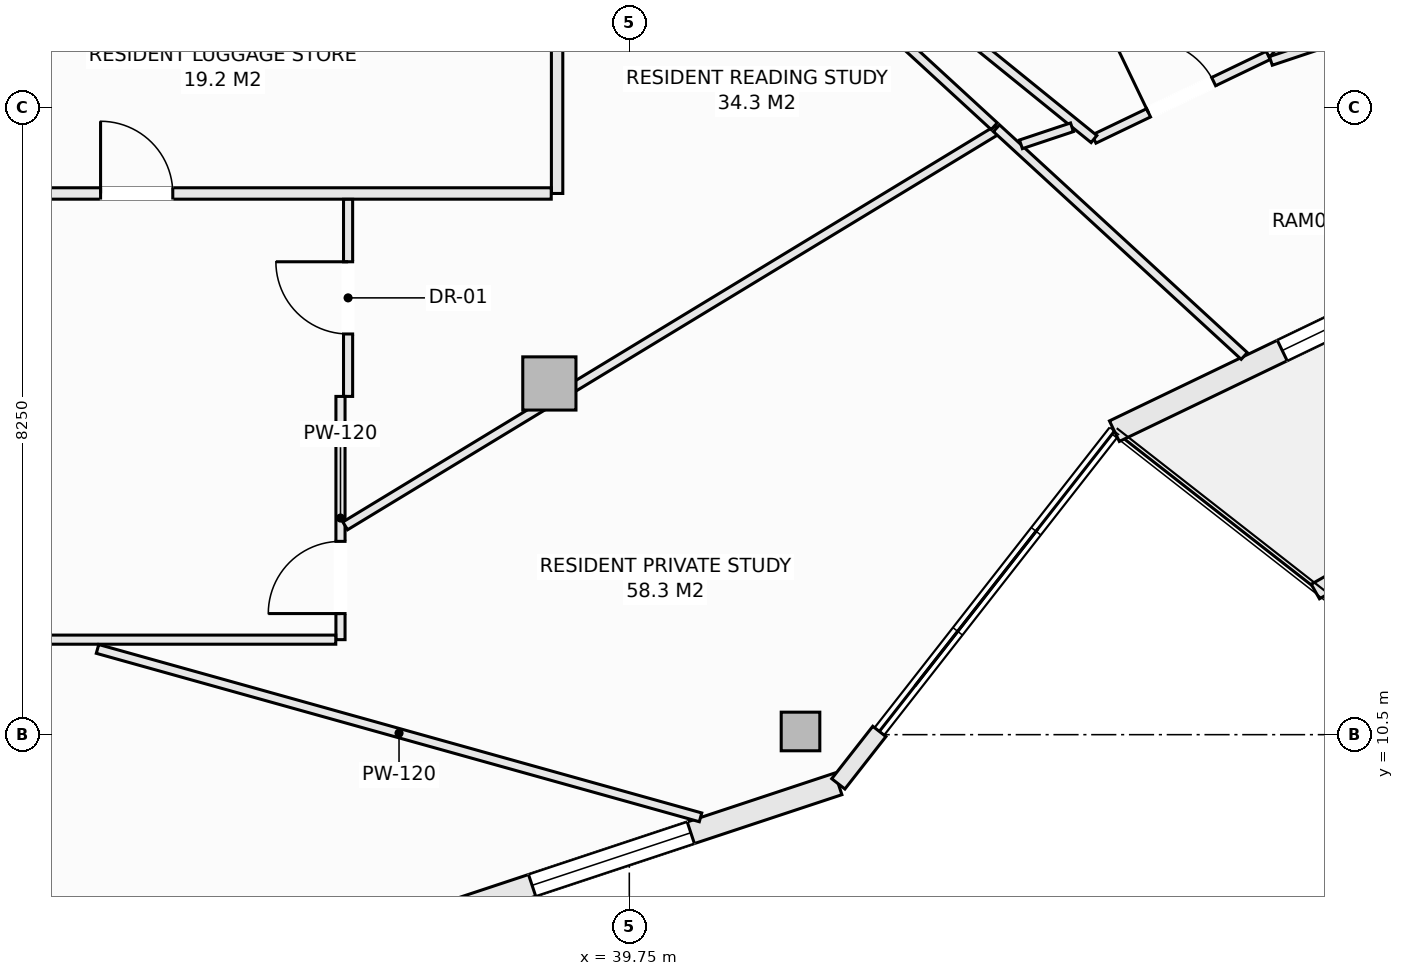
"""IFC4 building model, lengths in metres.
Left out: names, types, materials, properties, quantities, classifications, styles, units other than length and angle.
Written with IfcOpenShell. Run it as: python <this file> out.ifc"""

import sys

from ifc_helpers import new_model, si_unit, direction, frame, frame_2d, origin, origin_2d, place, context, subcontext, project, spatial, rectangle, hollow_rectangle, extrude, element, fill, save


model = new_model("IFC4")
c1 = context("Model", 3, precision=1e-05, world=origin(), true_north=direction((0.0, 1.0)))
c2 = subcontext(c1, "Body", "Model", "MODEL_VIEW")
j1 = project(units=[si_unit("LENGTHUNIT", "METRE"), si_unit("PLANEANGLEUNIT", "RADIAN")], contexts=[c1])
p1 = place(None, origin())
s1 = spatial("IfcSite", under=j1, at=p1, CompositionType="ELEMENT")
p2 = place(p1, origin())
s2 = spatial("IfcBuilding", under=s1, at=p2, CompositionType="ELEMENT")
p3 = place(p2, frame((0.0, 0.0, 219.5)))
s3 = spatial("IfcBuildingStorey", under=s2, at=p3, CompositionType="ELEMENT", Elevation=219.5)
p4 = place(p3, frame((42.003, 10.542, -0.27), z_axis=(0.0, 0.0, 1.0), x_axis=(1.0, 0.0, 0.0)))
e1 = element("IfcColumn", 1, at=p4, inside=s3, PredefinedType="COLUMN", context=c2, shape_type="SweptSolid", body=[
    extrude(hollow_rectangle(XDim=0.508, YDim=0.508, WallThickness=0.019, at=origin_2d()), origin(), (0.0, 0.0, 1.0), 3.3),
])
p5 = place(p3, frame((38.698, 15.121, -0.27), z_axis=(0.0, 0.0, 1.0), x_axis=(1.0, 0.0, 0.0)))
e2 = element("IfcColumn", 2, at=p5, inside=s3, PredefinedType="COLUMN", context=c2, shape_type="SweptSolid", body=[
    extrude(rectangle(XDim=0.7, YDim=0.7, at=origin_2d()), origin(), (0.0, 0.0, 1.0), 3.3),
])
p6 = place(p3, frame((36.531, 7.875, 0.0), z_axis=(0.0, 0.0, 1.0), x_axis=(0.949240877604, 0.314550085495, 0.0)))
e3 = element("IfcWall", 3, at=p6, inside=s3, PredefinedType="SOLIDWALL", context=c2, shape_type="SweptSolid", body=[
    extrude(rectangle(XDim=6.288, YDim=0.3, at=frame_2d((3.144, 0.0))), origin(), (0.0, 0.0, 1.0), 2.605),
])
p7 = place(p6, frame((2.044, 0.0, 0.72)))
e4 = element("IfcOpeningElement", 4, at=p7, cuts=e3, PredefinedType="OPENING", context=c2, shape_type="SweptSolid", body=[
    extrude(rectangle(XDim=2.2, YDim=1.65, at=frame_2d((1.1, 0.825))), frame((0.0, 0.16, 0.0), z_axis=(0.0, -1.0, 0.0), x_axis=(1.0, 0.0, 0.0)), (0.0, 0.0, 1.0), 0.32),
])
p8 = place(p3, frame((42.5, 9.853, 0.0), z_axis=(0.0, 0.0, 1.0), x_axis=(0.61650363284, 0.787352062736, 0.0)))
e5 = element("IfcWall", 5, at=p8, inside=s3, PredefinedType="SOLIDWALL", context=c2, shape_type="SweptSolid", body=[
    extrude(rectangle(XDim=0.876, YDim=0.22, at=frame_2d((0.438, 0.0))), origin(), (0.0, 0.0, 1.0), 2.605),
])
p9 = place(p3, frame((46.133, 14.493, 0.0), z_axis=(0.0, 0.0, 1.0), x_axis=(0.901348331142, 0.433094892545, 0.0)))
e6 = element("IfcWall", 6, at=p9, inside=s3, PredefinedType="SOLIDWALL", context=c2, shape_type="SweptSolid", body=[
    extrude(rectangle(XDim=6.021, YDim=0.3, at=frame_2d((3.01, 0.0))), origin(), (0.0, 0.0, 1.0), 2.605),
])
p10 = place(p9, frame((2.45, 0.0, 0.72)))
e7 = element("IfcOpeningElement", 7, at=p10, cuts=e6, PredefinedType="OPENING", context=c2, shape_type="SweptSolid", body=[
    extrude(rectangle(XDim=2.2, YDim=1.65, at=frame_2d((1.1, 0.825))), frame((0.0, 0.16, 0.0), z_axis=(0.0, -1.0, 0.0), x_axis=(1.0, 0.0, 0.0)), (0.0, 0.0, 1.0), 0.32),
])
p11 = place(p3, frame((48.776, 12.383, 0.0), z_axis=(0.0, 0.0, 1.0), x_axis=(0.869860619267, 0.493297580623, 0.0)))
e8 = element("IfcWall", 8, at=p11, inside=s3, PredefinedType="PARAPET", context=c2, shape_type="SweptSolid", body=[
    extrude(rectangle(XDim=6.743, YDim=0.22, at=frame_2d((3.371, 0.0))), origin(), (0.0, 0.0, 1.0), 0.52),
])
p12 = place(p3, frame((38.8, 17.62, 0.0), z_axis=(0.0, 0.0, 1.0), x_axis=(0.0, 1.0, 0.0)))
e9 = element("IfcWall", 9, at=p12, inside=s3, PredefinedType="PARTITIONING", context=c2, shape_type="SweptSolid", body=[
    extrude(rectangle(XDim=2.18, YDim=0.15, at=frame_2d((1.09, 0.0))), origin(), (0.0, 0.0, 1.0), 3.03),
])
p13 = place(p3, frame((30.077, 17.62, 0.0), z_axis=(0.0, 0.0, 1.0), x_axis=(1.0, 0.0, 0.0)))
e10 = element("IfcWall", 10, at=p13, inside=s3, PredefinedType="PARTITIONING", context=c2, shape_type="SweptSolid", body=[
    extrude(rectangle(XDim=8.646, YDim=0.15, at=frame_2d((4.323, 0.0))), origin(), (0.0, 0.0, 1.0), 3.03),
])
p14 = place(p13, frame((2.717, 0.0, 0.0)))
e11 = element("IfcOpeningElement", 11, at=p14, cuts=e10, PredefinedType="OPENING", context=c2, shape_type="SweptSolid", body=[
    extrude(rectangle(XDim=0.95, YDim=2.1, at=frame_2d((0.475, 1.05))), frame((0.0, 0.085, 0.0), z_axis=(0.0, -1.0, 0.0), x_axis=(1.0, 0.0, 0.0)), (0.0, 0.0, 1.0), 0.17),
])
p15 = place(p3, frame((41.52, 24.892, 0.0), z_axis=(0.0, 0.0, 1.0), x_axis=(0.777027167904, -0.629467060567, 0.0)))
e12 = element("IfcWall", 12, at=p15, inside=s3, PredefinedType="PARTITIONING", context=c2, shape_type="SweptSolid", body=[
    extrude(rectangle(XDim=8.62, YDim=0.12, at=frame_2d((4.31, 0.0))), origin(), (0.0, 0.0, 1.0), 2.77),
])
p16 = place(p15, frame((5.4, 0.0, 0.0)))
e13 = element("IfcOpeningElement", 13, at=p16, cuts=e12, PredefinedType="OPENING", context=c2, shape_type="SweptSolid", body=[
    extrude(rectangle(XDim=0.95, YDim=2.1, at=frame_2d((0.475, 1.05))), frame((0.0, 0.07, 0.0), z_axis=(0.0, -1.0, 0.0), x_axis=(1.0, 0.0, 0.0)), (0.0, 0.0, 1.0), 0.14),
])
p17 = place(p15, frame((1.578, 0.0, 0.0)))
e14 = element("IfcOpeningElement", 14, at=p17, cuts=e12, PredefinedType="OPENING", context=c2, shape_type="SweptSolid", body=[
    extrude(rectangle(XDim=0.95, YDim=2.1, at=frame_2d((0.475, 1.05))), frame((0.0, 0.07, 0.0), z_axis=(0.0, -1.0, 0.0), x_axis=(1.0, 0.0, 0.0)), (0.0, 0.0, 1.0), 0.14),
])
p18 = place(p3, frame((45.864, 18.336, 0.0), z_axis=(0.0, 0.0, 1.0), x_axis=(0.901512568896, 0.432752918097, 0.0)))
e15 = element("IfcWall", 15, at=p18, inside=s3, PredefinedType="PARTITIONING", context=c2, shape_type="SweptSolid", body=[
    extrude(rectangle(XDim=2.543, YDim=0.12, at=frame_2d((1.271, 0.0))), origin(), (0.0, 0.0, 1.0), 3.03),
])
p19 = place(p18, frame((0.796, 0.0, 0.0)))
e16 = element("IfcOpeningElement", 16, at=p19, cuts=e15, PredefinedType="OPENING", context=c2, shape_type="SweptSolid", body=[
    extrude(rectangle(XDim=0.95, YDim=2.1, at=frame_2d((0.475, 1.05))), frame((0.0, 0.07, 0.0), z_axis=(0.0, -1.0, 0.0), x_axis=(1.0, 0.0, 0.0)), (0.0, 0.0, 1.0), 0.14),
])
p20 = place(p3, frame((42.198, 21.306, 0.0), z_axis=(0.0, 0.0, 1.0), x_axis=(0.777012245854, -0.629485480208, 0.0)))
e17 = element("IfcWall", 17, at=p20, inside=s3, PredefinedType="PARTITIONING", context=c2, shape_type="SweptSolid", body=[
    extrude(rectangle(XDim=4.718, YDim=0.12, at=frame_2d((2.359, 0.0))), origin(), (0.0, 0.0, 1.0), 2.77),
])
p21 = place(p3, frame((36.05, 14.95, 0.0), z_axis=(0.0, 0.0, 1.0), x_axis=(0.0, 1.0, 0.0)))
e18 = element("IfcWall", 18, at=p21, inside=s3, PredefinedType="PARTITIONING", context=c2, shape_type="SweptSolid", body=[
    extrude(rectangle(XDim=2.593, YDim=0.12, at=frame_2d((1.296, 0.0))), origin(), (0.0, 0.0, 1.0), 3.03),
])
p22 = place(p21, frame((0.822, 0.0, 0.0)))
e19 = element("IfcOpeningElement", 19, at=p22, cuts=e18, PredefinedType="OPENING", context=c2, shape_type="SweptSolid", body=[
    extrude(rectangle(XDim=0.95, YDim=2.1, at=frame_2d((0.475, 1.05))), frame((0.0, 0.07, 0.0), z_axis=(0.0, -1.0, 0.0), x_axis=(1.0, 0.0, 0.0)), (0.0, 0.0, 1.0), 0.14),
])
p23 = place(p3, frame((35.95, 11.75, 0.0), z_axis=(0.0, 0.0, 1.0), x_axis=(0.0, 1.0, 0.0)))
e20 = element("IfcWall", 20, at=p23, inside=s3, PredefinedType="PARTITIONING", context=c2, shape_type="SweptSolid", body=[
    extrude(rectangle(XDim=3.2, YDim=0.12, at=frame_2d((1.6, 0.0))), origin(), (0.0, 0.0, 1.0), 3.03),
])
p24 = place(p23, frame((0.343, 0.0, 0.0)))
e21 = element("IfcOpeningElement", 21, at=p24, cuts=e20, PredefinedType="OPENING", context=c2, shape_type="SweptSolid", body=[
    extrude(rectangle(XDim=0.95, YDim=2.1, at=frame_2d((0.475, 1.05))), frame((0.0, 0.07, 0.0), z_axis=(0.0, -1.0, 0.0), x_axis=(1.0, 0.0, 0.0)), (0.0, 0.0, 1.0), 0.14),
])
p25 = place(p3, frame((27.227, 11.75, 0.0), z_axis=(0.0, 0.0, 1.0), x_axis=(1.0, 0.0, 0.0)))
e22 = element("IfcWall", 22, at=p25, inside=s3, PredefinedType="PARTITIONING", context=c2, shape_type="SweptSolid", body=[
    extrude(rectangle(XDim=8.661, YDim=0.12, at=frame_2d((4.331, 0.0))), origin(), (0.0, 0.0, 1.0), 3.03),
])
p26 = place(p25, frame((2.602, 0.0, 0.0)))
e23 = element("IfcOpeningElement", 23, at=p26, cuts=e22, PredefinedType="OPENING", context=c2, shape_type="SweptSolid", body=[
    extrude(rectangle(XDim=0.95, YDim=2.1, at=frame_2d((0.475, 1.05))), frame((0.0, 0.07, 0.0), z_axis=(0.0, -1.0, 0.0), x_axis=(1.0, 0.0, 0.0)), (0.0, 0.0, 1.0), 0.14),
])
p27 = place(p3, frame((32.753, 11.628, 0.0), z_axis=(0.0, 0.0, 1.0), x_axis=(0.96314203236, -0.26899335587, 0.0)))
e24 = element("IfcWall", 24, at=p27, inside=s3, PredefinedType="PARTITIONING", context=c2, shape_type="SweptSolid", body=[
    extrude(rectangle(XDim=8.238, YDim=0.12, at=frame_2d((4.119, 0.0))), origin(), (0.0, 0.0, 1.0), 2.605),
])
p28 = place(p3, frame((36.012, 13.247, 0.0), z_axis=(0.0, 0.0, 1.0), x_axis=(0.85474937032, 0.519040955934, 0.0)))
e25 = element("IfcWall", 25, at=p28, inside=s3, PredefinedType="PARTITIONING", context=c2, shape_type="SweptSolid", body=[
    extrude(rectangle(XDim=10.04, YDim=0.12, at=frame_2d((5.02, 0.0))), origin(), (0.0, 0.0, 1.0), 3.03),
])
p29 = place(p3, frame((39.706, 22.958, 0.0), z_axis=(0.0, 0.0, 1.0), x_axis=(0.73633751064, -0.676614417837, 0.0)))
e26 = element("IfcWall", 26, at=p29, inside=s3, PredefinedType="PARTITIONING", context=c2, shape_type="SweptSolid", body=[
    extrude(rectangle(XDim=6.582, YDim=0.12, at=frame_2d((3.291, 0.0))), origin(), (0.0, 0.0, 1.0), 3.03),
])
p30 = place(p3, frame((44.581, 18.478, 0.0), z_axis=(0.0, 0.0, 1.0), x_axis=(0.736361674887, -0.676588119729, 0.0)))
e27 = element("IfcWall", 27, at=p30, inside=s3, PredefinedType="PARTITIONING", context=c2, shape_type="SweptSolid", body=[
    extrude(rectangle(XDim=4.427, YDim=0.12, at=frame_2d((2.214, 0.0))), origin(), (0.0, 0.0, 1.0), 3.03),
])
p31 = place(p3, frame((44.903, 18.267, 0.0), z_axis=(0.0, 0.0, 1.0), x_axis=(0.948614335511, 0.316434578488, 0.0)))
e28 = element("IfcWall", 28, at=p31, inside=s3, PredefinedType="PARTITIONING", context=c2, shape_type="SweptSolid", body=[
    extrude(rectangle(XDim=0.708, YDim=0.12, at=frame_2d((0.354, 0.0))), origin(), (0.0, 0.0, 1.0), 3.03),
])
p32 = place(p3, frame((48.191, 19.364, 0.0), z_axis=(0.0, 0.0, 1.0), x_axis=(0.948573630056, 0.316556580033, 0.0)))
e29 = element("IfcWall", 29, at=p32, inside=s3, PredefinedType="PARTITIONING", context=c2, shape_type="SweptSolid", body=[
    extrude(rectangle(XDim=5.568, YDim=0.12, at=frame_2d((2.784, 0.0))), origin(), (0.0, 0.0, 1.0), 3.03),
])
p33 = place(p7, origin())
e30 = element("IfcWindow", 30, at=p33, inside=s3, PartitioningType="SINGLE_PANEL", PredefinedType="WINDOW", context=c2, shape_type="SweptSolid", body=[
    extrude(rectangle(XDim=2.2, YDim=1.65, at=frame_2d((1.1, 0.825))), frame((0.0, 0.03, 0.0), z_axis=(0.0, -1.0, 0.0), x_axis=(1.0, 0.0, 0.0)), (0.0, 0.0, 1.0), 0.06),
])
fill(e4, e30)
p34 = place(p10, origin())
e31 = element("IfcWindow", 31, at=p34, inside=s3, PartitioningType="SINGLE_PANEL", PredefinedType="WINDOW", context=c2, shape_type="SweptSolid", body=[
    extrude(rectangle(XDim=2.2, YDim=1.65, at=frame_2d((1.1, 0.825))), frame((0.0, 0.03, 0.0), z_axis=(0.0, -1.0, 0.0), x_axis=(1.0, 0.0, 0.0)), (0.0, 0.0, 1.0), 0.06),
])
fill(e7, e31)
p35 = place(p14, origin())
e32 = element("IfcDoor", 32, at=p35, inside=s3, OperationType="SINGLE_SWING_LEFT", PredefinedType="DOOR", context=c2, shape_type="SweptSolid", body=[
    extrude(rectangle(XDim=0.95, YDim=2.1, at=frame_2d((0.475, 1.05))), frame((0.0, 0.025, 0.0), z_axis=(0.0, -1.0, 0.0), x_axis=(1.0, 0.0, 0.0)), (0.0, 0.0, 1.0), 0.05),
])
fill(e11, e32)
p36 = place(p24, origin())
e33 = element("IfcDoor", 33, at=p36, inside=s3, OperationType="SINGLE_SWING_LEFT", PredefinedType="DOOR", context=c2, shape_type="SweptSolid", body=[
    extrude(rectangle(XDim=0.95, YDim=2.1, at=frame_2d((0.475, 1.05))), frame((0.0, 0.025, 0.0), z_axis=(0.0, -1.0, 0.0), x_axis=(1.0, 0.0, 0.0)), (0.0, 0.0, 1.0), 0.05),
])
fill(e21, e33)
p37 = place(p22, origin())
e34 = element("IfcDoor", 34, at=p37, inside=s3, OperationType="SINGLE_SWING_RIGHT", PredefinedType="DOOR", context=c2, shape_type="SweptSolid", body=[
    extrude(rectangle(XDim=0.95, YDim=2.1, at=frame_2d((0.475, 1.05))), frame((0.0, 0.025, 0.0), z_axis=(0.0, -1.0, 0.0), x_axis=(1.0, 0.0, 0.0)), (0.0, 0.0, 1.0), 0.05),
])
fill(e19, e34)
p38 = place(p19, origin())
e35 = element("IfcDoor", 35, at=p38, inside=s3, OperationType="SINGLE_SWING_LEFT", PredefinedType="DOOR", context=c2, shape_type="SweptSolid", body=[
    extrude(rectangle(XDim=0.95, YDim=2.1, at=frame_2d((0.475, 1.05))), frame((0.0, 0.025, 0.0), z_axis=(0.0, -1.0, 0.0), x_axis=(1.0, 0.0, 0.0)), (0.0, 0.0, 1.0), 0.05),
])
fill(e16, e35)
save(model, sys.argv[1])
